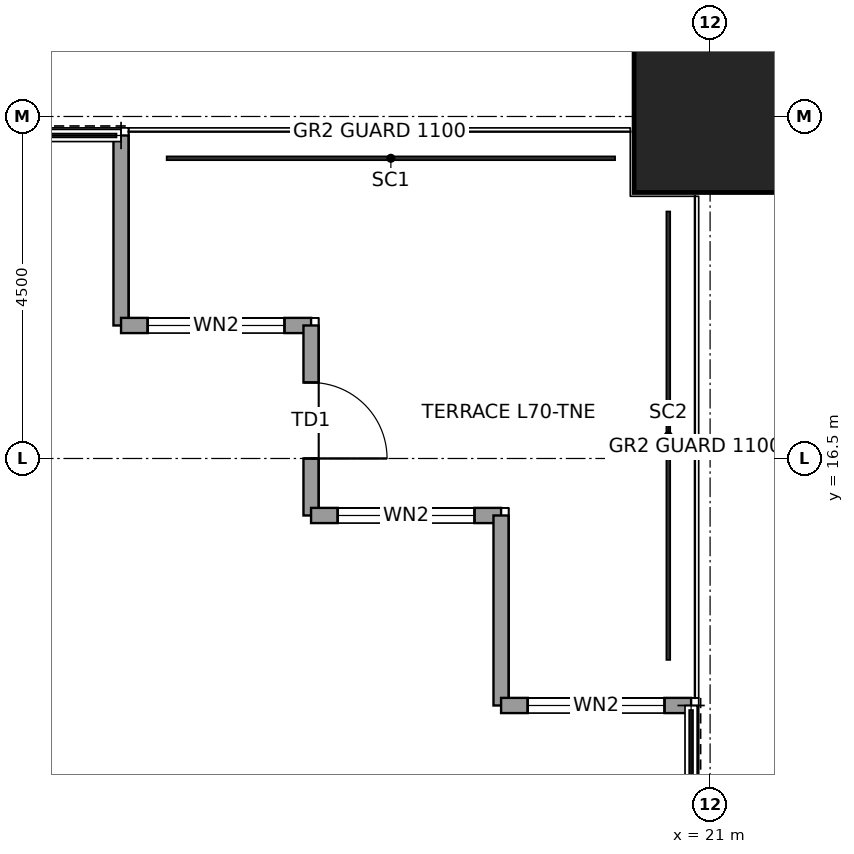
"""IFC4 building model, lengths in metres.
Left out: names, types, materials, properties, quantities, classifications, styles, units other than length and angle.
Written with IfcOpenShell. Run it as: python <this file> out.ifc"""

import sys

from ifc_helpers import new_model, si_unit, direction, frame, frame_2d, origin, origin_2d, place, context, subcontext, project, spatial, rectangle, hollow_rectangle, extrude, element, fill, save


model = new_model("IFC4")
c1 = context("Model", 3, precision=1e-05, world=origin(), true_north=direction((0.0, 1.0)))
c2 = subcontext(c1, "Body", "Model", "MODEL_VIEW")
j1 = project(units=[si_unit("LENGTHUNIT", "METRE"), si_unit("PLANEANGLEUNIT", "RADIAN")], contexts=[c1])
p1 = place(None, origin())
s1 = spatial("IfcSite", under=j1, at=p1, CompositionType="ELEMENT")
p2 = place(p1, origin())
s2 = spatial("IfcBuilding", under=s1, at=p2, CompositionType="ELEMENT")
p3 = place(p2, frame((0.0, 0.0, 315.9)))
s3 = spatial("IfcBuildingStorey", under=s2, at=p3, CompositionType="ELEMENT", Elevation=315.9)
p4 = place(p3, frame((21.0, 21.0, 0.0), z_axis=(0.0, 0.0, 1.0), x_axis=(1.0, 0.0, 0.0)))
e1 = element("IfcColumn", 1, at=p4, inside=s3, PredefinedType="COLUMN", context=c2, shape_type="SweptSolid", body=[
    extrude(hollow_rectangle(XDim=2.0, YDim=2.0, WallThickness=0.095, at=origin_2d()), origin(), (0.0, 0.0, 1.0), 4.0),
])
p5 = place(p3, frame((13.25, 20.75, 0.0), z_axis=(0.0, 0.0, 1.0), x_axis=(0.0, -1.0, 0.0)))
e2 = element("IfcWall", 2, at=p5, inside=s3, PredefinedType="SOLIDWALL", context=c2, shape_type="SweptSolid", body=[
    extrude(rectangle(XDim=2.5, YDim=0.2, at=frame_2d((1.25, 0.0))), origin(), (0.0, 0.0, 1.0), 3.85),
])
p6 = place(p3, frame((13.25, 18.25, 0.0), z_axis=(0.0, 0.0, 1.0), x_axis=(1.0, 0.0, 0.0)))
e3 = element("IfcWall", 3, at=p6, inside=s3, PredefinedType="SOLIDWALL", context=c2, shape_type="SweptSolid", body=[
    extrude(rectangle(XDim=2.5, YDim=0.2, at=frame_2d((1.25, 0.0))), origin(), (0.0, 0.0, 1.0), 3.85),
])
p7 = place(p6, frame((0.35, 0.0, 0.3)))
e4 = element("IfcOpeningElement", 4, at=p7, cuts=e3, PredefinedType="OPENING", context=c2, shape_type="SweptSolid", body=[
    extrude(rectangle(XDim=1.8, YDim=2.4, at=frame_2d((0.9, 1.2))), frame((0.0, 0.11, 0.0), z_axis=(0.0, -1.0, 0.0), x_axis=(1.0, 0.0, 0.0)), (0.0, 0.0, 1.0), 0.22),
])
p8 = place(p3, frame((15.75, 18.25, 0.0), z_axis=(0.0, 0.0, 1.0), x_axis=(0.0, -1.0, 0.0)))
e5 = element("IfcWall", 5, at=p8, inside=s3, PredefinedType="SOLIDWALL", context=c2, shape_type="SweptSolid", body=[
    extrude(rectangle(XDim=2.5, YDim=0.2, at=frame_2d((1.25, 0.0))), origin(), (0.0, 0.0, 1.0), 3.317),
])
p9 = place(p8, frame((0.75, 0.0, 0.0)))
e6 = element("IfcOpeningElement", 6, at=p9, cuts=e5, PredefinedType="OPENING", context=c2, shape_type="SweptSolid", body=[
    extrude(rectangle(XDim=1.0, YDim=2.4, at=frame_2d((0.5, 1.2))), frame((0.0, 0.11, 0.0), z_axis=(0.0, -1.0, 0.0), x_axis=(1.0, 0.0, 0.0)), (0.0, 0.0, 1.0), 0.22),
])
p10 = place(p3, frame((15.75, 15.75, 0.0), z_axis=(0.0, 0.0, 1.0), x_axis=(1.0, 0.0, 0.0)))
e7 = element("IfcWall", 7, at=p10, inside=s3, PredefinedType="SOLIDWALL", context=c2, shape_type="SweptSolid", body=[
    extrude(rectangle(XDim=2.5, YDim=0.2, at=frame_2d((1.25, 0.0))), origin(), (0.0, 0.0, 1.0), 3.85),
])
p11 = place(p10, frame((0.35, 0.0, 0.3)))
e8 = element("IfcOpeningElement", 8, at=p11, cuts=e7, PredefinedType="OPENING", context=c2, shape_type="SweptSolid", body=[
    extrude(rectangle(XDim=1.8, YDim=2.4, at=frame_2d((0.9, 1.2))), frame((0.0, 0.11, 0.0), z_axis=(0.0, -1.0, 0.0), x_axis=(1.0, 0.0, 0.0)), (0.0, 0.0, 1.0), 0.22),
])
p12 = place(p3, frame((18.25, 15.75, 0.0), z_axis=(0.0, 0.0, 1.0), x_axis=(0.0, -1.0, 0.0)))
e9 = element("IfcWall", 9, at=p12, inside=s3, PredefinedType="SOLIDWALL", context=c2, shape_type="SweptSolid", body=[
    extrude(rectangle(XDim=2.5, YDim=0.2, at=frame_2d((1.25, 0.0))), origin(), (0.0, 0.0, 1.0), 3.85),
])
p13 = place(p3, frame((18.25, 13.25, 0.0), z_axis=(0.0, 0.0, 1.0), x_axis=(1.0, 0.0, 0.0)))
e10 = element("IfcWall", 10, at=p13, inside=s3, PredefinedType="SOLIDWALL", context=c2, shape_type="SweptSolid", body=[
    extrude(rectangle(XDim=2.5, YDim=0.2, at=frame_2d((1.25, 0.0))), origin(), (0.0, 0.0, 1.0), 3.85),
])
p14 = place(p13, frame((0.35, 0.0, 0.3)))
e11 = element("IfcOpeningElement", 11, at=p14, cuts=e10, PredefinedType="OPENING", context=c2, shape_type="SweptSolid", body=[
    extrude(rectangle(XDim=1.8, YDim=2.4, at=frame_2d((0.9, 1.2))), frame((0.0, 0.11, 0.0), z_axis=(0.0, -1.0, 0.0), x_axis=(1.0, 0.0, 0.0)), (0.0, 0.0, 1.0), 0.22),
])
p15 = place(p7, origin())
e12 = element("IfcWindow", 12, at=p15, inside=s3, PartitioningType="SINGLE_PANEL", PredefinedType="WINDOW", context=c2, shape_type="SweptSolid", body=[
    extrude(rectangle(XDim=1.8, YDim=2.4, at=frame_2d((0.9, 1.2))), frame((0.0, 0.03, 0.0), z_axis=(0.0, -1.0, 0.0), x_axis=(1.0, 0.0, 0.0)), (0.0, 0.0, 1.0), 0.06),
])
fill(e4, e12)
p16 = place(p9, origin())
e13 = element("IfcDoor", 13, at=p16, inside=s3, OperationType="SINGLE_SWING_RIGHT", PredefinedType="DOOR", context=c2, shape_type="SweptSolid", body=[
    extrude(rectangle(XDim=1.0, YDim=2.4, at=frame_2d((0.5, 1.2))), frame((0.0, 0.025, 0.0), z_axis=(0.0, -1.0, 0.0), x_axis=(1.0, 0.0, 0.0)), (0.0, 0.0, 1.0), 0.05),
])
fill(e6, e13)
p17 = place(p11, origin())
e14 = element("IfcWindow", 14, at=p17, inside=s3, PartitioningType="SINGLE_PANEL", PredefinedType="WINDOW", context=c2, shape_type="SweptSolid", body=[
    extrude(rectangle(XDim=1.8, YDim=2.4, at=frame_2d((0.9, 1.2))), frame((0.0, 0.03, 0.0), z_axis=(0.0, -1.0, 0.0), x_axis=(1.0, 0.0, 0.0)), (0.0, 0.0, 1.0), 0.06),
])
fill(e8, e14)
p18 = place(p14, origin())
e15 = element("IfcWindow", 15, at=p18, inside=s3, PartitioningType="SINGLE_PANEL", PredefinedType="WINDOW", context=c2, shape_type="SweptSolid", body=[
    extrude(rectangle(XDim=1.8, YDim=2.4, at=frame_2d((0.9, 1.2))), frame((0.0, 0.03, 0.0), z_axis=(0.0, -1.0, 0.0), x_axis=(1.0, 0.0, 0.0)), (0.0, 0.0, 1.0), 0.06),
])
fill(e11, e15)
save(model, sys.argv[1])
